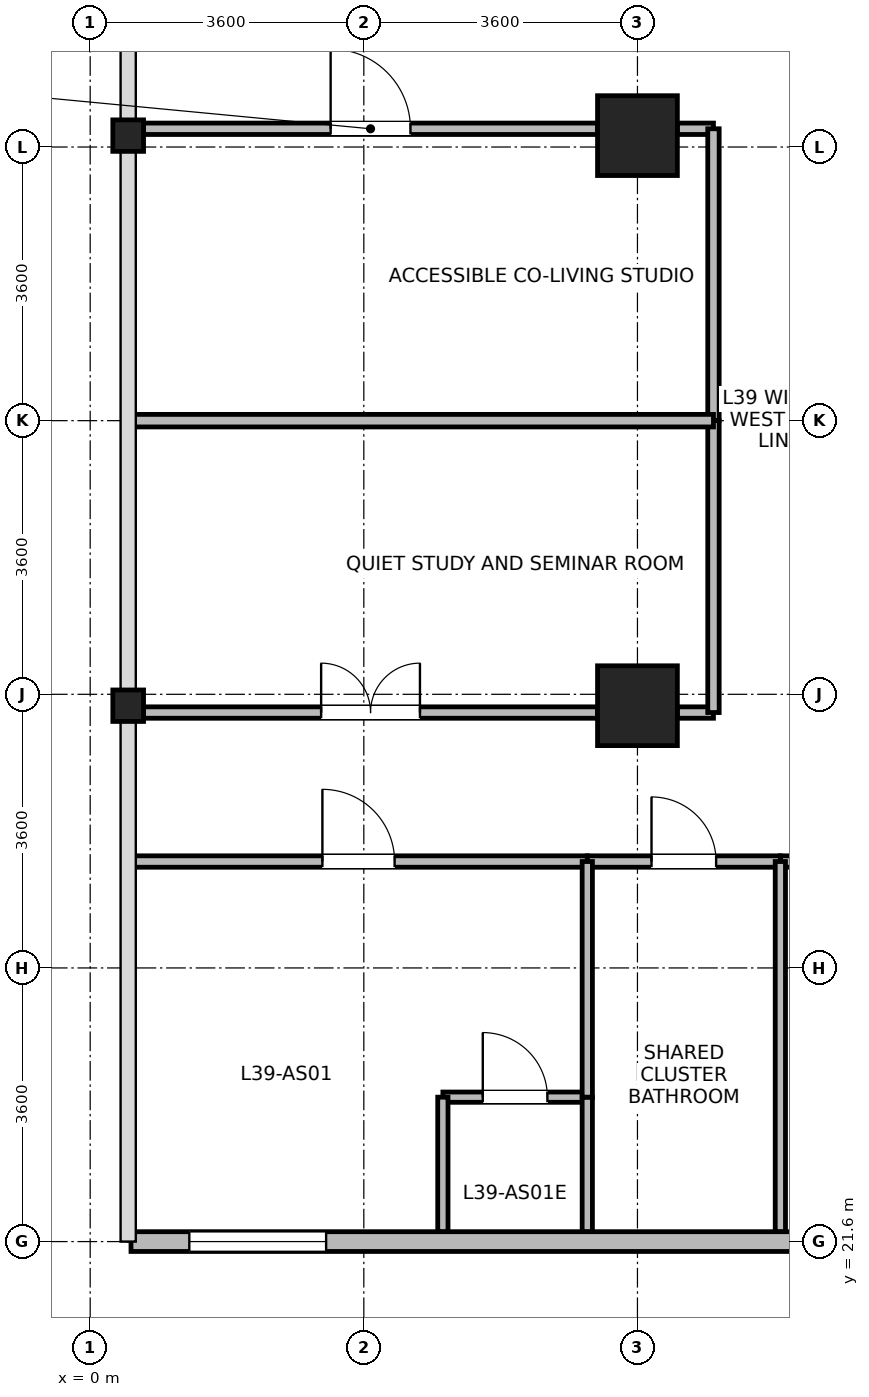
"""IFC4 building model, lengths in metres.
Left out: names, types, materials, properties, quantities, classifications, styles, units other than length and angle.
Written with IfcOpenShell. Run it as: python <this file> out.ifc"""

import sys

from ifc_helpers import new_model, si_unit, direction, frame, frame_2d, origin, origin_2d, place, context, subcontext, project, spatial, rectangle, i_section, extrude, source, transform, mapped, element, fill, save


model = new_model("IFC4")
c1 = context("Model", 3, precision=1e-05, world=origin(), true_north=direction((0.0, 1.0)))
c2 = subcontext(c1, "Body", "Model", "MODEL_VIEW")
j1 = project(units=[si_unit("LENGTHUNIT", "METRE"), si_unit("PLANEANGLEUNIT", "RADIAN")], contexts=[c1])
p1 = place(None, origin())
s1 = spatial("IfcSite", under=j1, at=p1, CompositionType="ELEMENT")
p2 = place(p1, origin())
s2 = spatial("IfcBuilding", under=s1, at=p2, CompositionType="ELEMENT")
p3 = place(p2, frame((0.0, 0.0, 155.0)))
s3 = spatial("IfcBuildingStorey", under=s2, at=p3, CompositionType="ELEMENT", Elevation=155.0)
m1 = source(origin(), c2, "Body", "SweptSolid", [
    extrude(rectangle(XDim=1.05, YDim=1.05, at=origin_2d()), origin(), (0.0, 0.0, 1.0), 3.7),
])
for number, where, z_axis, x_axis in (
    (1, (7.2, 28.65, 0.0), (0.0, 0.0, 1.0), (1.0, 0.0, 0.0)),
    (2, (7.2, 36.15, 0.0), (0.0, 0.0, 1.0), (1.0, 0.0, 0.0)),
):
    element("IfcColumn", number, at=place(p3, frame(where, z_axis=z_axis, x_axis=x_axis)), inside=s3, PredefinedType="COLUMN", context=c2, shape_type="MappedRepresentation", body=[
        mapped(m1, transform((0.0, 0.0, 0.0), x_axis=(1.0, 0.0, 0.0), y_axis=(0.0, 1.0, 0.0), z_axis=(0.0, 0.0, 1.0), scale=1.0)),
    ])
m2 = source(origin(), c2, "Body", "SweptSolid", [
    extrude(i_section(OverallWidth=0.404, OverallDepth=0.414, WebThickness=0.021, FlangeThickness=0.028, FilletRadius=0.015, at=origin_2d()), origin(), (0.0, 0.0, 1.0), 3.7),
])
for number, where, z_axis, x_axis in (
    (3, (0.5, 28.65, 0.0), (0.0, 0.0, 1.0), (1.0, 0.0, 0.0)),
    (4, (0.5, 36.15, 0.0), (0.0, 0.0, 1.0), (1.0, 0.0, 0.0)),
):
    element("IfcColumn", number, at=place(p3, frame(where, z_axis=z_axis, x_axis=x_axis)), inside=s3, PredefinedType="COLUMN", context=c2, shape_type="MappedRepresentation", body=[
        mapped(m2, transform((0.0, 0.0, 0.0), x_axis=(1.0, 0.0, 0.0), y_axis=(0.0, 1.0, 0.0), z_axis=(0.0, 0.0, 1.0), scale=1.0)),
    ])
p4 = place(p3, frame((13.874, 21.6, 0.0), z_axis=(0.0, 0.0, 1.0), x_axis=(-1.0, 0.0, 0.0)))
e5 = element("IfcWall", 5, at=p4, inside=s3, PredefinedType="STANDARD", context=c2, shape_type="SweptSolid", body=[
    extrude(rectangle(XDim=13.337, YDim=0.26, at=frame_2d((6.668, 0.0))), origin(), (0.0, 0.0, 1.0), 3.44),
])
p5 = place(p4, frame((0.767, 0.0, 0.85)))
e6 = element("IfcOpeningElement", 6, at=p5, cuts=e5, PredefinedType="OPENING", context=c2, shape_type="SweptSolid", body=[
    extrude(rectangle(XDim=1.8, YDim=1.85, at=frame_2d((0.9, 0.925))), frame((0.0, 0.14, 0.0), z_axis=(0.0, -1.0, 0.0), x_axis=(1.0, 0.0, 0.0)), (0.0, 0.0, 1.0), 0.28),
])
p6 = place(p4, frame((10.77, 0.0, 0.85)))
e7 = element("IfcOpeningElement", 7, at=p6, cuts=e5, PredefinedType="OPENING", context=c2, shape_type="SweptSolid", body=[
    extrude(rectangle(XDim=1.8, YDim=1.85, at=frame_2d((0.9, 0.925))), frame((0.0, 0.14, 0.0), z_axis=(0.0, -1.0, 0.0), x_axis=(1.0, 0.0, 0.0)), (0.0, 0.0, 1.0), 0.28),
])
p7 = place(p3, frame((4.64, 23.5, 0.0), z_axis=(0.0, 0.0, 1.0), x_axis=(1.0, 0.0, 0.0)))
e8 = element("IfcWall", 8, at=p7, inside=s3, PredefinedType="PARTITIONING", context=c2, shape_type="SweptSolid", body=[
    extrude(rectangle(XDim=1.9, YDim=0.135, at=frame_2d((0.95, 0.0))), origin(), (0.0, 0.0, 1.0), 3.44),
])
p8 = place(p7, frame((0.525, 0.0, 0.0)))
e9 = element("IfcOpeningElement", 9, at=p8, cuts=e8, PredefinedType="OPENING", context=c2, shape_type="SweptSolid", body=[
    extrude(rectangle(XDim=0.85, YDim=2.04, at=frame_2d((0.425, 1.02))), frame((0.0, 0.078, 0.0), z_axis=(0.0, -1.0, 0.0), x_axis=(1.0, 0.0, 0.0)), (0.0, 0.0, 1.0), 0.155),
])
for number, where, z_axis, x_axis in (
    (10, (4.64, 21.732, 0.0), (0.0, 0.0, 1.0), (0.0, 1.0, 0.0)),
    (11, (6.54, 21.732, 0.0), (0.0, 0.0, 1.0), (0.0, 1.0, 0.0)),
):
    element("IfcWall", number, at=place(p3, frame(where, z_axis=z_axis, x_axis=x_axis)), inside=s3, PredefinedType="PARTITIONING", context=c2, shape_type="SweptSolid", body=[
        extrude(rectangle(XDim=1.768, YDim=0.135, at=frame_2d((0.884, 0.0))), origin(), (0.0, 0.0, 1.0), 3.44),
    ])
p9 = place(p3, frame((0.702, 28.56, 0.0), z_axis=(0.0, 0.0, 1.0), x_axis=(1.0, 0.0, 0.0)))
e12 = element("IfcWall", 12, at=p9, inside=s3, PredefinedType="PARTITIONING", context=c2, shape_type="SweptSolid", body=[
    extrude(rectangle(XDim=5.973, YDim=0.15, at=frame_2d((2.987, 0.0))), origin(), (0.0, 0.0, 1.0), 2.84),
])
p10 = place(p9, frame((2.336, 0.0, 0.0)))
e13 = element("IfcOpeningElement", 13, at=p10, cuts=e12, PredefinedType="OPENING", context=c2, shape_type="SweptSolid", body=[
    extrude(rectangle(XDim=1.3, YDim=2.12, at=frame_2d((0.65, 1.06))), frame((0.0, 0.085, 0.0), z_axis=(0.0, -1.0, 0.0), x_axis=(1.0, 0.0, 0.0)), (0.0, 0.0, 1.0), 0.17),
])
p11 = place(p3, frame((7.725, 28.56, 0.0), z_axis=(0.0, 0.0, 1.0), x_axis=(1.0, 0.0, 0.0)))
e14 = element("IfcWall", 14, at=p11, inside=s3, PredefinedType="PARTITIONING", context=c2, shape_type="SweptSolid", body=[
    extrude(rectangle(XDim=0.475, YDim=0.15, at=frame_2d((0.237, 0.0))), origin(), (0.0, 0.0, 1.0), 2.84),
])
p12 = place(p3, frame((0.702, 36.24, 0.0), z_axis=(0.0, 0.0, 1.0), x_axis=(1.0, 0.0, 0.0)))
e15 = element("IfcWall", 15, at=p12, inside=s3, PredefinedType="PARTITIONING", context=c2, shape_type="SweptSolid", body=[
    extrude(rectangle(XDim=5.973, YDim=0.15, at=frame_2d((2.987, 0.0))), origin(), (0.0, 0.0, 1.0), 2.84),
])
p13 = place(p12, frame((2.461, 0.0, 0.0)))
e16 = element("IfcOpeningElement", 16, at=p13, cuts=e15, PredefinedType="OPENING", context=c2, shape_type="SweptSolid", body=[
    extrude(rectangle(XDim=1.05, YDim=2.12, at=frame_2d((0.525, 1.06))), frame((0.0, 0.085, 0.0), z_axis=(0.0, -1.0, 0.0), x_axis=(1.0, 0.0, 0.0)), (0.0, 0.0, 1.0), 0.17),
])
p14 = place(p3, frame((7.725, 36.24, 0.0), z_axis=(0.0, 0.0, 1.0), x_axis=(1.0, 0.0, 0.0)))
e17 = element("IfcWall", 17, at=p14, inside=s3, PredefinedType="PARTITIONING", context=c2, shape_type="SweptSolid", body=[
    extrude(rectangle(XDim=0.475, YDim=0.15, at=frame_2d((0.237, 0.0))), origin(), (0.0, 0.0, 1.0), 2.84),
])
p15 = place(p3, frame((0.52, 26.6, 0.0), z_axis=(0.0, 0.0, 1.0), x_axis=(1.0, 0.0, 0.0)))
e18 = element("IfcWall", 18, at=p15, inside=s3, PredefinedType="PARTITIONING", context=c2, shape_type="SweptSolid", body=[
    extrude(rectangle(XDim=6.02, YDim=0.15, at=frame_2d((3.01, 0.0))), origin(), (0.0, 0.0, 1.0), 3.44),
])
p16 = place(p15, frame((2.535, 0.0, 0.0)))
e19 = element("IfcOpeningElement", 19, at=p16, cuts=e18, PredefinedType="OPENING", context=c2, shape_type="SweptSolid", body=[
    extrude(rectangle(XDim=0.95, YDim=2.1, at=frame_2d((0.475, 1.05))), frame((0.0, 0.085, 0.0), z_axis=(0.0, -1.0, 0.0), x_axis=(1.0, 0.0, 0.0)), (0.0, 0.0, 1.0), 0.17),
])
p17 = place(p3, frame((9.08, 26.6, 0.0), z_axis=(0.0, 0.0, 1.0), x_axis=(1.0, 0.0, 0.0)))
e20 = element("IfcWall", 20, at=p17, inside=s3, PredefinedType="PARTITIONING", context=c2, shape_type="SweptSolid", body=[
    extrude(rectangle(XDim=4.68, YDim=0.15, at=frame_2d((2.34, 0.0))), origin(), (0.0, 0.0, 1.0), 3.44),
])
p18 = place(p17, frame((1.865, 0.0, 0.0)))
e21 = element("IfcOpeningElement", 21, at=p18, cuts=e20, PredefinedType="OPENING", context=c2, shape_type="SweptSolid", body=[
    extrude(rectangle(XDim=0.95, YDim=2.1, at=frame_2d((0.475, 1.05))), frame((0.0, 0.085, 0.0), z_axis=(0.0, -1.0, 0.0), x_axis=(1.0, 0.0, 0.0)), (0.0, 0.0, 1.0), 0.17),
])
p19 = place(p3, frame((8.2, 32.4, 0.0), z_axis=(0.0, 0.0, 1.0), x_axis=(0.0, 1.0, 0.0)))
e22 = element("IfcWall", 22, at=p19, inside=s3, PredefinedType="PARTITIONING", context=c2, shape_type="SweptSolid", body=[
    extrude(rectangle(XDim=3.84, YDim=0.15, at=frame_2d((1.92, 0.0))), origin(), (0.0, 0.0, 1.0), 3.44),
])
p20 = place(p3, frame((8.2, 28.56, 0.0), z_axis=(0.0, 0.0, 1.0), x_axis=(0.0, 1.0, 0.0)))
e23 = element("IfcWall", 23, at=p20, inside=s3, PredefinedType="PARTITIONING", context=c2, shape_type="SweptSolid", body=[
    extrude(rectangle(XDim=3.84, YDim=0.15, at=frame_2d((1.92, 0.0))), origin(), (0.0, 0.0, 1.0), 3.44),
])
p21 = place(p3, frame((6.54, 26.6, 0.0), z_axis=(0.0, 0.0, 1.0), x_axis=(1.0, 0.0, 0.0)))
e24 = element("IfcWall", 24, at=p21, inside=s3, PredefinedType="PARTITIONING", context=c2, shape_type="SweptSolid", body=[
    extrude(rectangle(XDim=2.54, YDim=0.15, at=frame_2d((1.27, 0.0))), origin(), (0.0, 0.0, 1.0), 3.44),
])
p22 = place(p21, frame((0.845, 0.0, 0.0)))
e25 = element("IfcOpeningElement", 25, at=p22, cuts=e24, PredefinedType="OPENING", context=c2, shape_type="SweptSolid", body=[
    extrude(rectangle(XDim=0.85, YDim=2.04, at=frame_2d((0.425, 1.02))), frame((0.0, 0.085, 0.0), z_axis=(0.0, -1.0, 0.0), x_axis=(1.0, 0.0, 0.0)), (0.0, 0.0, 1.0), 0.17),
])
p23 = place(p3, frame((0.52, 32.4, 0.0), z_axis=(0.0, 0.0, 1.0), x_axis=(1.0, 0.0, 0.0)))
e26 = element("IfcWall", 26, at=p23, inside=s3, PredefinedType="PARTITIONING", context=c2, shape_type="SweptSolid", body=[
    extrude(rectangle(XDim=7.68, YDim=0.165, at=frame_2d((3.84, 0.0))), origin(), (0.0, 0.0, 1.0), 3.44),
])
p24 = place(p3, frame((9.08, 21.732, 0.0), z_axis=(0.0, 0.0, 1.0), x_axis=(0.0, 1.0, 0.0)))
e27 = element("IfcWall", 27, at=p24, inside=s3, PredefinedType="PARTITIONING", context=c2, shape_type="SweptSolid", body=[
    extrude(rectangle(XDim=4.868, YDim=0.135, at=frame_2d((2.434, 0.0))), origin(), (0.0, 0.0, 1.0), 3.44),
])
p25 = place(p3, frame((6.54, 23.5, 0.0), z_axis=(0.0, 0.0, 1.0), x_axis=(0.0, 1.0, 0.0)))
e28 = element("IfcWall", 28, at=p25, inside=s3, PredefinedType="PARTITIONING", context=c2, shape_type="SweptSolid", body=[
    extrude(rectangle(XDim=3.1, YDim=0.135, at=frame_2d((1.55, 0.0))), origin(), (0.0, 0.0, 1.0), 3.44),
])
p26 = place(p6, origin())
e29 = element("IfcWindow", 29, at=p26, inside=s3, PartitioningType="SINGLE_PANEL", PredefinedType="WINDOW", context=c2, shape_type="SweptSolid", body=[
    extrude(rectangle(XDim=1.8, YDim=1.85, at=frame_2d((0.9, 0.925))), frame((0.0, 0.03, 0.0), z_axis=(0.0, -1.0, 0.0), x_axis=(1.0, 0.0, 0.0)), (0.0, 0.0, 1.0), 0.06),
])
fill(e7, e29)
p27 = place(p8, origin())
e30 = element("IfcDoor", 30, at=p27, inside=s3, OperationType="SINGLE_SWING_LEFT", PredefinedType="DOOR", context=c2, shape_type="SweptSolid", body=[
    extrude(rectangle(XDim=0.85, YDim=2.04, at=frame_2d((0.425, 1.02))), frame((0.0, 0.025, 0.0), z_axis=(0.0, -1.0, 0.0), x_axis=(1.0, 0.0, 0.0)), (0.0, 0.0, 1.0), 0.05),
])
fill(e9, e30)
p28 = place(p10, origin())
e31 = element("IfcDoor", 31, at=p28, inside=s3, OperationType="DOUBLE_DOOR_SINGLE_SWING", PredefinedType="DOOR", context=c2, shape_type="SweptSolid", body=[
    extrude(rectangle(XDim=1.3, YDim=2.12, at=frame_2d((0.65, 1.06))), frame((0.0, 0.025, 0.0), z_axis=(0.0, -1.0, 0.0), x_axis=(1.0, 0.0, 0.0)), (0.0, 0.0, 1.0), 0.05),
])
fill(e13, e31)
p29 = place(p13, origin())
e32 = element("IfcDoor", 32, at=p29, inside=s3, OperationType="SINGLE_SWING_LEFT", PredefinedType="DOOR", context=c2, shape_type="SweptSolid", body=[
    extrude(rectangle(XDim=1.05, YDim=2.12, at=frame_2d((0.525, 1.06))), frame((0.0, 0.025, 0.0), z_axis=(0.0, -1.0, 0.0), x_axis=(1.0, 0.0, 0.0)), (0.0, 0.0, 1.0), 0.05),
])
fill(e16, e32)
p30 = place(p16, origin())
e33 = element("IfcDoor", 33, at=p30, inside=s3, OperationType="SINGLE_SWING_LEFT", PredefinedType="DOOR", context=c2, shape_type="SweptSolid", body=[
    extrude(rectangle(XDim=0.95, YDim=2.1, at=frame_2d((0.475, 1.05))), frame((0.0, 0.025, 0.0), z_axis=(0.0, -1.0, 0.0), x_axis=(1.0, 0.0, 0.0)), (0.0, 0.0, 1.0), 0.05),
])
fill(e19, e33)
p31 = place(p22, origin())
e34 = element("IfcDoor", 34, at=p31, inside=s3, OperationType="SINGLE_SWING_LEFT", PredefinedType="DOOR", context=c2, shape_type="SweptSolid", body=[
    extrude(rectangle(XDim=0.85, YDim=2.04, at=frame_2d((0.425, 1.02))), frame((0.0, 0.025, 0.0), z_axis=(0.0, -1.0, 0.0), x_axis=(1.0, 0.0, 0.0)), (0.0, 0.0, 1.0), 0.05),
])
fill(e25, e34)
save(model, sys.argv[1])
